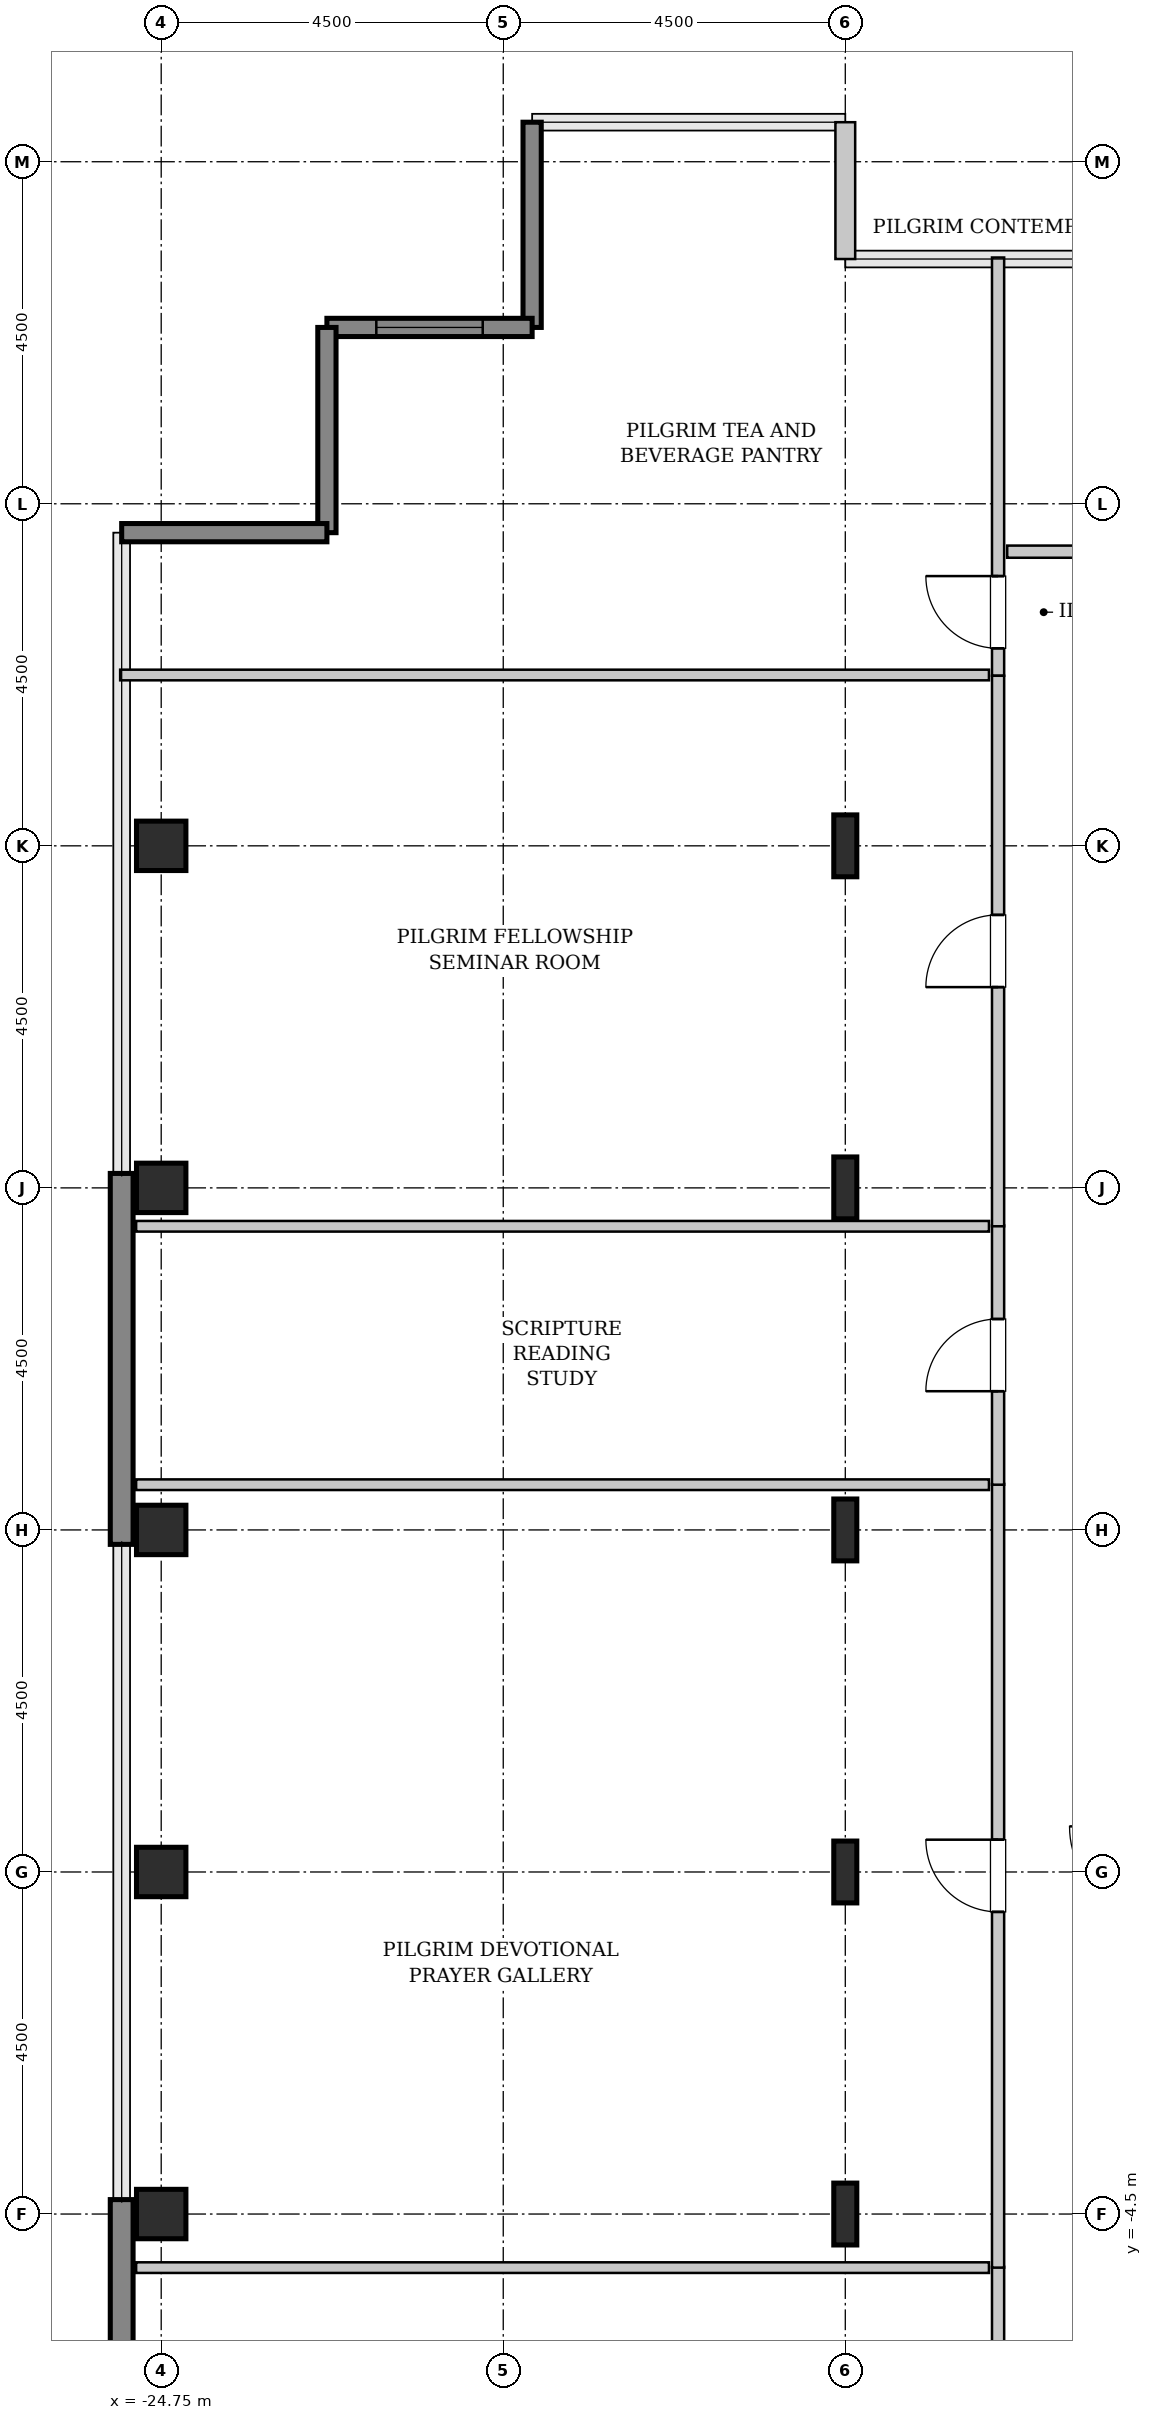
"""IFC4 building model, lengths in metres.
Left out: names, types, materials, properties, quantities, classifications, styles, units other than length and angle.
Written with IfcOpenShell. Run it as: python <this file> out.ifc"""

import sys

from ifc_helpers import new_model, si_unit, direction, frame, frame_2d, origin, origin_2d, place, context, subcontext, project, spatial, rectangle, hollow_rectangle, i_section, extrude, source, transform, mapped, element, fill, save


model = new_model("IFC4")
c1 = context("Model", 3, precision=1e-05, world=origin(), true_north=direction((0.0, 1.0)))
c2 = subcontext(c1, "Body", "Model", "MODEL_VIEW")
j1 = project(units=[si_unit("LENGTHUNIT", "METRE"), si_unit("PLANEANGLEUNIT", "RADIAN")], contexts=[c1])
p1 = place(None, origin())
s1 = spatial("IfcSite", under=j1, at=p1, CompositionType="ELEMENT")
p2 = place(p1, origin())
s2 = spatial("IfcBuilding", under=s1, at=p2, CompositionType="ELEMENT")
p3 = place(p2, frame((0.0, 0.0, 229.4)))
s3 = spatial("IfcBuildingStorey", under=s2, at=p3, CompositionType="ELEMENT", Elevation=229.4)
m1 = source(origin(), c2, "Body", "SweptSolid", [
    extrude(hollow_rectangle(XDim=0.65, YDim=0.65, WallThickness=0.032, InnerFilletRadius=0.032, OuterFilletRadius=0.064, at=origin_2d()), origin(), (0.0, 0.0, 1.0), 3.8),
])
for number, where, z_axis, x_axis in (
    (1, (-24.75, -4.5, 0.0), (0.0, 0.0, 1.0), (1.0, 0.0, 0.0)),
    (2, (-24.75, 0.0, 0.0), (0.0, 0.0, 1.0), (1.0, 0.0, 0.0)),
    (3, (-24.75, 4.5, 0.0), (0.0, 0.0, 1.0), (1.0, 0.0, 0.0)),
    (4, (-24.75, 9.0, 0.0), (0.0, 0.0, 1.0), (1.0, 0.0, 0.0)),
    (5, (-24.75, 13.5, 0.0), (0.0, 0.0, 1.0), (1.0, 0.0, 0.0)),
):
    element("IfcColumn", number, at=place(p3, frame(where, z_axis=z_axis, x_axis=x_axis)), inside=s3, PredefinedType="COLUMN", context=c2, shape_type="MappedRepresentation", body=[
        mapped(m1, transform((0.0, 0.0, 0.0), x_axis=(1.0, 0.0, 0.0), y_axis=(0.0, 1.0, 0.0), z_axis=(0.0, 0.0, 1.0), scale=1.0)),
    ])
m2 = source(origin(), c2, "Body", "SweptSolid", [
    extrude(i_section(OverallWidth=0.303, OverallDepth=0.814, WebThickness=0.021, FlangeThickness=0.04, FilletRadius=0.03, at=origin_2d()), origin(), (0.0, 0.0, 1.0), 3.8),
])
for number, where, z_axis, x_axis in (
    (6, (-15.75, -4.5, 0.0), (0.0, 0.0, 1.0), (1.0, 0.0, 0.0)),
    (7, (-15.75, 0.0, 0.0), (0.0, 0.0, 1.0), (1.0, 0.0, 0.0)),
    (8, (-15.75, 4.5, 0.0), (0.0, 0.0, 1.0), (1.0, 0.0, 0.0)),
    (9, (-15.75, 9.0, 0.0), (0.0, 0.0, 1.0), (1.0, 0.0, 0.0)),
    (10, (-15.75, 13.5, 0.0), (0.0, 0.0, 1.0), (1.0, 0.0, 0.0)),
):
    element("IfcColumn", number, at=place(p3, frame(where, z_axis=z_axis, x_axis=x_axis)), inside=s3, PredefinedType="COLUMN", context=c2, shape_type="MappedRepresentation", body=[
        mapped(m2, transform((0.0, 0.0, 0.0), x_axis=(1.0, 0.0, 0.0), y_axis=(0.0, 1.0, 0.0), z_axis=(0.0, 0.0, 1.0), scale=1.0)),
    ])
m3 = source(origin(), c2, "Body", "SweptSolid", [
    extrude(rectangle(XDim=4.88, YDim=0.3, at=frame_2d((2.44, 0.0))), origin(), (0.0, 0.0, 1.0), 3.55),
])
for number, where, z_axis, x_axis in (
    (11, (-25.27, -9.19, 0.0), (0.0, 0.0, 1.0), (0.0, 1.0, 0.0)),
    (12, (-25.27, 4.31, 0.0), (0.0, 0.0, 1.0), (0.0, 1.0, 0.0)),
):
    element("IfcWall", number, at=place(p3, frame(where, z_axis=z_axis, x_axis=x_axis)), inside=s3, PredefinedType="SHEAR", context=c2, shape_type="MappedRepresentation", body=[
        mapped(m3, transform((0.0, 0.0, 0.0), x_axis=(1.0, 0.0, 0.0), y_axis=(0.0, 1.0, 0.0), z_axis=(0.0, 0.0, 1.0), scale=1.0)),
    ])
m4 = source(origin(), c2, "Body", "SweptSolid", [
    extrude(rectangle(XDim=1.8, YDim=0.26, at=frame_2d((0.9, 0.0))), origin(), (0.0, 0.0, 1.0), 3.55),
])
p4 = place(p3, frame((-15.75, 21.22, 0.0), z_axis=(0.0, 0.0, 1.0), x_axis=(0.0, 1.0, 0.0)))
e13 = element("IfcWall", 13, at=p4, inside=s3, PredefinedType="SOLIDWALL", context=c2, shape_type="MappedRepresentation", body=[
    mapped(m4, transform((0.0, 0.0, 0.0), x_axis=(1.0, 0.0, 0.0), y_axis=(0.0, 1.0, 0.0), z_axis=(0.0, 0.0, 1.0), scale=1.0)),
])
m5 = source(origin(), c2, "Body", "SweptSolid", [
    extrude(rectangle(XDim=2.7, YDim=0.24, at=frame_2d((1.35, 0.0))), origin(), (0.0, 0.0, 1.0), 3.55),
])
p5 = place(p3, frame((-19.87, 23.02, 0.0), z_axis=(0.0, 0.0, 1.0), x_axis=(0.0, -1.0, 0.0)))
e14 = element("IfcWall", 14, at=p5, inside=s3, PredefinedType="SHEAR", context=c2, shape_type="MappedRepresentation", body=[
    mapped(m5, transform((0.0, 0.0, 0.0), x_axis=(1.0, 0.0, 0.0), y_axis=(0.0, 1.0, 0.0), z_axis=(0.0, 0.0, 1.0), scale=1.0)),
])
p6 = place(p3, frame((-19.87, 20.32, 0.0), z_axis=(0.0, 0.0, 1.0), x_axis=(-1.0, 0.0, 0.0)))
e15 = element("IfcWall", 15, at=p6, inside=s3, PredefinedType="SHEAR", context=c2, shape_type="MappedRepresentation", body=[
    mapped(m5, transform((0.0, 0.0, 0.0), x_axis=(1.0, 0.0, 0.0), y_axis=(0.0, 1.0, 0.0), z_axis=(0.0, 0.0, 1.0), scale=1.0)),
])
p7 = place(p6, frame((0.65, 0.0, 0.85)))
e16 = element("IfcOpeningElement", 16, at=p7, cuts=e15, PredefinedType="OPENING", context=c2, shape_type="SweptSolid", body=[
    extrude(rectangle(XDim=1.4, YDim=1.8, at=frame_2d((0.7, 0.9))), frame((0.0, 0.13, 0.0), z_axis=(0.0, -1.0, 0.0), x_axis=(1.0, 0.0, 0.0)), (0.0, 0.0, 1.0), 0.26),
])
for number, where, z_axis, x_axis in (
    (17, (-22.57, 20.32, 0.0), (0.0, 0.0, 1.0), (0.0, -1.0, 0.0)),
    (18, (-22.57, 17.62, 0.0), (0.0, 0.0, 1.0), (-1.0, 0.0, 0.0)),
):
    element("IfcWall", number, at=place(p3, frame(where, z_axis=z_axis, x_axis=x_axis)), inside=s3, PredefinedType="SHEAR", context=c2, shape_type="MappedRepresentation", body=[
        mapped(m5, transform((0.0, 0.0, 0.0), x_axis=(1.0, 0.0, 0.0), y_axis=(0.0, 1.0, 0.0), z_axis=(0.0, 0.0, 1.0), scale=1.0)),
    ])
m6 = source(origin(), c2, "Body", "SweptSolid", [
    extrude(rectangle(XDim=3.31, YDim=0.16, at=frame_2d((1.655, 0.0))), origin(), (0.0, 0.0, 1.0), 3.535),
])
p8 = place(p3, frame((-13.74, -8.505, 0.0), z_axis=(0.0, 0.0, 1.0), x_axis=(0.0, 1.0, 0.0)))
e19 = element("IfcWall", 19, at=p8, inside=s3, PredefinedType="PARTITIONING", context=c2, shape_type="MappedRepresentation", body=[
    mapped(m6, transform((0.0, 0.0, 0.0), x_axis=(1.0, 0.0, 0.0), y_axis=(0.0, 1.0, 0.0), z_axis=(0.0, 0.0, 1.0), scale=1.0)),
])
p9 = place(p8, frame((1.18, 0.0, 0.0)))
e20 = element("IfcOpeningElement", 20, at=p9, cuts=e19, PredefinedType="OPENING", context=c2, shape_type="SweptSolid", body=[
    extrude(rectangle(XDim=0.95, YDim=2.1, at=frame_2d((0.475, 1.05))), frame((0.0, 0.09, 0.0), z_axis=(0.0, -1.0, 0.0), x_axis=(1.0, 0.0, 0.0)), (0.0, 0.0, 1.0), 0.18),
])
m7 = source(origin(), c2, "Body", "SweptSolid", [
    extrude(rectangle(XDim=11.22, YDim=0.14, at=frame_2d((5.61, 0.0))), origin(), (0.0, 0.0, 1.0), 3.535),
])
p10 = place(p3, frame((-25.08, -5.205, 0.0), z_axis=(0.0, 0.0, 1.0), x_axis=(1.0, 0.0, 0.0)))
e21 = element("IfcWall", 21, at=p10, inside=s3, PredefinedType="PARTITIONING", context=c2, shape_type="MappedRepresentation", body=[
    mapped(m7, transform((0.0, 0.0, 0.0), x_axis=(1.0, 0.0, 0.0), y_axis=(0.0, 1.0, 0.0), z_axis=(0.0, 0.0, 1.0), scale=1.0)),
])
m8 = source(origin(), c2, "Body", "SweptSolid", [
    extrude(rectangle(XDim=10.31, YDim=0.16, at=frame_2d((5.155, 0.0))), origin(), (0.0, 0.0, 1.0), 3.535),
])
p11 = place(p3, frame((-13.74, -5.205, 0.0), z_axis=(0.0, 0.0, 1.0), x_axis=(0.0, 1.0, 0.0)))
e22 = element("IfcWall", 22, at=p11, inside=s3, PredefinedType="PARTITIONING", context=c2, shape_type="MappedRepresentation", body=[
    mapped(m8, transform((0.0, 0.0, 0.0), x_axis=(1.0, 0.0, 0.0), y_axis=(0.0, 1.0, 0.0), z_axis=(0.0, 0.0, 1.0), scale=1.0)),
])
p12 = place(p11, frame((4.68, 0.0, 0.0)))
e23 = element("IfcOpeningElement", 23, at=p12, cuts=e22, PredefinedType="OPENING", context=c2, shape_type="SweptSolid", body=[
    extrude(rectangle(XDim=0.95, YDim=2.1, at=frame_2d((0.475, 1.05))), frame((0.0, 0.09, 0.0), z_axis=(0.0, -1.0, 0.0), x_axis=(1.0, 0.0, 0.0)), (0.0, 0.0, 1.0), 0.18),
])
p13 = place(p3, frame((-25.08, 5.095, 0.0), z_axis=(0.0, 0.0, 1.0), x_axis=(1.0, 0.0, 0.0)))
e24 = element("IfcWall", 24, at=p13, inside=s3, PredefinedType="PARTITIONING", context=c2, shape_type="MappedRepresentation", body=[
    mapped(m7, transform((0.0, 0.0, 0.0), x_axis=(1.0, 0.0, 0.0), y_axis=(0.0, 1.0, 0.0), z_axis=(0.0, 0.0, 1.0), scale=1.0)),
])
m9 = source(origin(), c2, "Body", "SweptSolid", [
    extrude(rectangle(XDim=3.41, YDim=0.16, at=frame_2d((1.705, 0.0))), origin(), (0.0, 0.0, 1.0), 3.535),
])
p14 = place(p3, frame((-13.74, 5.095, 0.0), z_axis=(0.0, 0.0, 1.0), x_axis=(0.0, 1.0, 0.0)))
e25 = element("IfcWall", 25, at=p14, inside=s3, PredefinedType="PARTITIONING", context=c2, shape_type="MappedRepresentation", body=[
    mapped(m9, transform((0.0, 0.0, 0.0), x_axis=(1.0, 0.0, 0.0), y_axis=(0.0, 1.0, 0.0), z_axis=(0.0, 0.0, 1.0), scale=1.0)),
])
p15 = place(p14, frame((1.23, 0.0, 0.0)))
e26 = element("IfcOpeningElement", 26, at=p15, cuts=e25, PredefinedType="OPENING", context=c2, shape_type="SweptSolid", body=[
    extrude(rectangle(XDim=0.95, YDim=2.1, at=frame_2d((0.475, 1.05))), frame((0.0, 0.09, 0.0), z_axis=(0.0, -1.0, 0.0), x_axis=(1.0, 0.0, 0.0)), (0.0, 0.0, 1.0), 0.18),
])
m10 = source(origin(), c2, "Body", "SweptSolid", [
    extrude(rectangle(XDim=11.22, YDim=0.14, at=frame_2d((5.61, 0.0))), origin(), (0.0, 0.0, 1.0), 2.925),
])
p16 = place(p3, frame((-25.08, 8.495, 0.0), z_axis=(0.0, 0.0, 1.0), x_axis=(1.0, 0.0, 0.0)))
e27 = element("IfcWall", 27, at=p16, inside=s3, PredefinedType="PARTITIONING", context=c2, shape_type="MappedRepresentation", body=[
    mapped(m10, transform((0.0, 0.0, 0.0), x_axis=(1.0, 0.0, 0.0), y_axis=(0.0, 1.0, 0.0), z_axis=(0.0, 0.0, 1.0), scale=1.0)),
])
m11 = source(origin(), c2, "Body", "SweptSolid", [
    extrude(rectangle(XDim=5.502, YDim=0.16, at=frame_2d((2.751, 0.0))), origin(), (0.0, 0.0, 1.0), 3.535),
])
p17 = place(p3, frame((-13.74, 15.738, 0.0), z_axis=(0.0, 0.0, 1.0), x_axis=(0.0, 1.0, 0.0)))
e28 = element("IfcWall", 28, at=p17, inside=s3, PredefinedType="PARTITIONING", context=c2, shape_type="MappedRepresentation", body=[
    mapped(m11, transform((0.0, 0.0, 0.0), x_axis=(1.0, 0.0, 0.0), y_axis=(0.0, 1.0, 0.0), z_axis=(0.0, 0.0, 1.0), scale=1.0)),
])
p18 = place(p17, frame((0.361, 0.0, 0.0)))
e29 = element("IfcOpeningElement", 29, at=p18, cuts=e28, PredefinedType="OPENING", context=c2, shape_type="SweptSolid", body=[
    extrude(rectangle(XDim=0.95, YDim=2.1, at=frame_2d((0.475, 1.05))), frame((0.0, 0.09, 0.0), z_axis=(0.0, -1.0, 0.0), x_axis=(1.0, 0.0, 0.0)), (0.0, 0.0, 1.0), 0.18),
])
m12 = source(origin(), c2, "Body", "SweptSolid", [
    extrude(rectangle(XDim=11.43, YDim=0.14, at=frame_2d((5.715, 0.0))), origin(), (0.0, 0.0, 1.0), 3.535),
])
p19 = place(p3, frame((-25.29, 15.748, 0.0), z_axis=(0.0, 0.0, 1.0), x_axis=(1.0, 0.0, 0.0)))
e30 = element("IfcWall", 30, at=p19, inside=s3, PredefinedType="PARTITIONING", context=c2, shape_type="MappedRepresentation", body=[
    mapped(m12, transform((0.0, 0.0, 0.0), x_axis=(1.0, 0.0, 0.0), y_axis=(0.0, 1.0, 0.0), z_axis=(0.0, 0.0, 1.0), scale=1.0)),
])
m13 = source(origin(), c2, "Body", "SweptSolid", [
    extrude(rectangle(XDim=7.242, YDim=0.16, at=frame_2d((3.621, 0.0))), origin(), (0.0, 0.0, 1.0), 3.535),
])
p20 = place(p3, frame((-13.74, 8.495, 0.0), z_axis=(0.0, 0.0, 1.0), x_axis=(0.0, 1.0, 0.0)))
e31 = element("IfcWall", 31, at=p20, inside=s3, PredefinedType="PARTITIONING", context=c2, shape_type="MappedRepresentation", body=[
    mapped(m13, transform((0.0, 0.0, 0.0), x_axis=(1.0, 0.0, 0.0), y_axis=(0.0, 1.0, 0.0), z_axis=(0.0, 0.0, 1.0), scale=1.0)),
])
p21 = place(p20, frame((3.146, 0.0, 0.0)))
e32 = element("IfcOpeningElement", 32, at=p21, cuts=e31, PredefinedType="OPENING", context=c2, shape_type="SweptSolid", body=[
    extrude(rectangle(XDim=0.95, YDim=2.1, at=frame_2d((0.475, 1.05))), frame((0.0, 0.09, 0.0), z_axis=(0.0, -1.0, 0.0), x_axis=(1.0, 0.0, 0.0)), (0.0, 0.0, 1.0), 0.18),
])
m14 = source(origin(), c2, "Body", "SweptSolid", [
    extrude(rectangle(XDim=4.16, YDim=0.16, at=frame_2d((2.08, 0.0))), origin(), (0.0, 0.0, 1.0), 3.535),
])
p22 = place(p3, frame((-13.62, 17.37, 0.0), z_axis=(0.0, 0.0, 1.0), x_axis=(1.0, 0.0, 0.0)))
e33 = element("IfcWall", 33, at=p22, inside=s3, PredefinedType="PARTITIONING", context=c2, shape_type="MappedRepresentation", body=[
    mapped(m14, transform((0.0, 0.0, 0.0), x_axis=(1.0, 0.0, 0.0), y_axis=(0.0, 1.0, 0.0), z_axis=(0.0, 0.0, 1.0), scale=1.0)),
])
p23 = place(p22, frame((0.969, 0.0, 0.0)))
e34 = element("IfcOpeningElement", 34, at=p23, cuts=e33, PredefinedType="OPENING", context=c2, shape_type="SweptSolid", body=[
    extrude(rectangle(XDim=0.95, YDim=2.1, at=frame_2d((0.475, 1.05))), frame((0.0, 0.09, 0.0), z_axis=(0.0, -1.0, 0.0), x_axis=(1.0, 0.0, 0.0)), (0.0, 0.0, 1.0), 0.18),
])
m15 = source(origin(), c2, "Body", "SweptSolid", [
    extrude(rectangle(XDim=1.4, YDim=1.8, at=frame_2d((0.7, 0.9))), frame((0.0, 0.03, 0.0), z_axis=(0.0, -1.0, 0.0), x_axis=(1.0, 0.0, 0.0)), (0.0, 0.0, 1.0), 0.06),
])
p24 = place(p7, origin())
e35 = element("IfcWindow", 35, at=p24, inside=s3, PartitioningType="SINGLE_PANEL", PredefinedType="WINDOW", context=c2, shape_type="MappedRepresentation", body=[
    mapped(m15, transform((0.0, 0.0, 0.0), x_axis=(1.0, 0.0, 0.0), y_axis=(0.0, 1.0, 0.0), z_axis=(0.0, 0.0, 1.0), scale=1.0)),
])
fill(e16, e35)
m16 = source(origin(), c2, "Body", "SweptSolid", [
    extrude(rectangle(XDim=0.95, YDim=2.1, at=frame_2d((0.475, 1.05))), frame((0.0, 0.025, 0.0), z_axis=(0.0, -1.0, 0.0), x_axis=(1.0, 0.0, 0.0)), (0.0, 0.0, 1.0), 0.05),
])
p25 = place(p12, origin())
e36 = element("IfcDoor", 36, at=p25, inside=s3, OperationType="SINGLE_SWING_RIGHT", PredefinedType="DOOR", context=c2, shape_type="MappedRepresentation", body=[
    mapped(m16, transform((0.0, 0.0, 0.0), x_axis=(1.0, 0.0, 0.0), y_axis=(0.0, 1.0, 0.0), z_axis=(0.0, 0.0, 1.0), scale=1.0)),
])
fill(e23, e36)
p26 = place(p15, origin())
e37 = element("IfcDoor", 37, at=p26, inside=s3, OperationType="SINGLE_SWING_LEFT", PredefinedType="DOOR", context=c2, shape_type="MappedRepresentation", body=[
    mapped(m16, transform((0.0, 0.0, 0.0), x_axis=(1.0, 0.0, 0.0), y_axis=(0.0, 1.0, 0.0), z_axis=(0.0, 0.0, 1.0), scale=1.0)),
])
fill(e26, e37)
p27 = place(p18, origin())
e38 = element("IfcDoor", 38, at=p27, inside=s3, OperationType="SINGLE_SWING_RIGHT", PredefinedType="DOOR", context=c2, shape_type="MappedRepresentation", body=[
    mapped(m16, transform((0.0, 0.0, 0.0), x_axis=(1.0, 0.0, 0.0), y_axis=(0.0, 1.0, 0.0), z_axis=(0.0, 0.0, 1.0), scale=1.0)),
])
fill(e29, e38)
p28 = place(p21, origin())
e39 = element("IfcDoor", 39, at=p28, inside=s3, OperationType="SINGLE_SWING_LEFT", PredefinedType="DOOR", context=c2, shape_type="MappedRepresentation", body=[
    mapped(m16, transform((0.0, 0.0, 0.0), x_axis=(1.0, 0.0, 0.0), y_axis=(0.0, 1.0, 0.0), z_axis=(0.0, 0.0, 1.0), scale=1.0)),
])
fill(e32, e39)
save(model, sys.argv[1])
